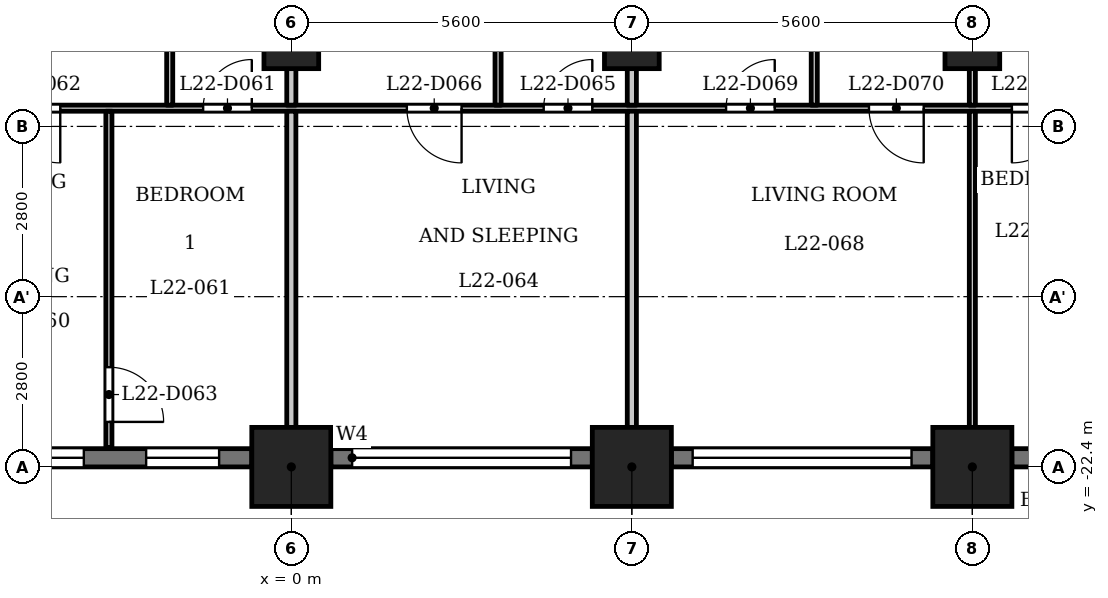
"""IFC4 building model, lengths in metres.
Left out: names, types, materials, properties, quantities, classifications, styles, units other than length and angle.
Written with IfcOpenShell. Run it as: python <this file> out.ifc"""

import sys

from ifc_helpers import new_model, si_unit, direction, frame, frame_2d, origin, origin_2d, place, context, subcontext, project, spatial, rectangle, extrude, element, fill, save


model = new_model("IFC4")
c1 = context("Model", 3, precision=1e-05, world=origin(), true_north=direction((0.0, 1.0)))
c2 = subcontext(c1, "Body", "Model", "MODEL_VIEW")
j1 = project(units=[si_unit("LENGTHUNIT", "METRE"), si_unit("PLANEANGLEUNIT", "RADIAN")], contexts=[c1])
p1 = place(None, origin())
s1 = spatial("IfcSite", under=j1, at=p1, CompositionType="ELEMENT")
p2 = place(p1, origin())
s2 = spatial("IfcBuilding", under=s1, at=p2, CompositionType="ELEMENT")
p3 = place(p2, frame((0.0, 0.0, 90.3)))
s3 = spatial("IfcBuildingStorey", under=s2, at=p3, CompositionType="ELEMENT", Elevation=90.3)
for number, where, z_axis, x_axis in (
    (1, (0.0, -22.4, 0.0), (0.0, 0.0, 1.0), (1.0, 0.0, 0.0)),
    (2, (5.6, -22.4, 0.0), (0.0, 0.0, 1.0), (1.0, 0.0, 0.0)),
    (3, (11.2, -22.4, 0.0), (0.0, 0.0, 1.0), (1.0, 0.0, 0.0)),
):
    element("IfcColumn", number, at=place(p3, frame(where, z_axis=z_axis, x_axis=x_axis)), inside=s3, PredefinedType="COLUMN", context=c2, shape_type="SweptSolid", body=[
        extrude(rectangle(XDim=1.3, YDim=1.3, at=origin_2d()), origin(), (0.0, 0.0, 1.0), 3.5),
    ])
for number, where, z_axis, x_axis in (
    (4, (0.0, -15.4, 0.0), (0.0, 0.0, 1.0), (1.0, 0.0, 0.0)),
    (5, (5.6, -15.4, 0.0), (0.0, 0.0, 1.0), (1.0, 0.0, 0.0)),
    (6, (11.2, -15.4, 0.0), (0.0, 0.0, 1.0), (1.0, 0.0, 0.0)),
):
    element("IfcColumn", number, at=place(p3, frame(where, z_axis=z_axis, x_axis=x_axis)), inside=s3, PredefinedType="COLUMN", context=c2, shape_type="SweptSolid", body=[
        extrude(rectangle(XDim=0.9, YDim=0.9, at=origin_2d()), origin(), (0.0, 0.0, 1.0), 3.5),
    ])
p4 = place(p3, frame((-4.95, -22.25, 0.0), z_axis=(0.0, 0.0, 1.0), x_axis=(1.0, 0.0, 0.0)))
e7 = element("IfcWall", 7, at=p4, inside=s3, PredefinedType="SOLIDWALL", context=c2, shape_type="SweptSolid", body=[
    extrude(rectangle(XDim=4.3, YDim=0.3, at=frame_2d((2.15, 0.0))), origin(), (0.0, 0.0, 1.0), 2.4),
])
p5 = place(p4, frame((0.337, 0.0, 0.6)))
e8 = element("IfcOpeningElement", 8, at=p5, cuts=e7, PredefinedType="OPENING", context=c2, shape_type="SweptSolid", body=[
    extrude(rectangle(XDim=1.2, YDim=1.55, at=frame_2d((0.6, 0.775))), frame((0.0, 0.16, 0.0), z_axis=(0.0, -1.0, 0.0), x_axis=(1.0, 0.0, 0.0)), (0.0, 0.0, 1.0), 0.32),
])
p6 = place(p4, frame((2.562, 0.0, 0.6)))
e9 = element("IfcOpeningElement", 9, at=p6, cuts=e7, PredefinedType="OPENING", context=c2, shape_type="SweptSolid", body=[
    extrude(rectangle(XDim=1.2, YDim=1.55, at=frame_2d((0.6, 0.775))), frame((0.0, 0.16, 0.0), z_axis=(0.0, -1.0, 0.0), x_axis=(1.0, 0.0, 0.0)), (0.0, 0.0, 1.0), 0.32),
])
p7 = place(p3, frame((0.65, -22.25, 0.0), z_axis=(0.0, 0.0, 1.0), x_axis=(1.0, 0.0, 0.0)))
e10 = element("IfcWall", 10, at=p7, inside=s3, PredefinedType="SOLIDWALL", context=c2, shape_type="SweptSolid", body=[
    extrude(rectangle(XDim=4.3, YDim=0.3, at=frame_2d((2.15, 0.0))), origin(), (0.0, 0.0, 1.0), 2.4),
])
p8 = place(p7, frame((0.35, 0.0, 1.2)))
e11 = element("IfcOpeningElement", 11, at=p8, cuts=e10, PredefinedType="OPENING", context=c2, shape_type="SweptSolid", body=[
    extrude(rectangle(XDim=3.6, YDim=0.95, at=frame_2d((1.8, 0.475))), frame((0.0, 0.16, 0.0), z_axis=(0.0, -1.0, 0.0), x_axis=(1.0, 0.0, 0.0)), (0.0, 0.0, 1.0), 0.32),
])
p9 = place(p3, frame((6.25, -22.25, 0.0), z_axis=(0.0, 0.0, 1.0), x_axis=(1.0, 0.0, 0.0)))
e12 = element("IfcWall", 12, at=p9, inside=s3, PredefinedType="SOLIDWALL", context=c2, shape_type="SweptSolid", body=[
    extrude(rectangle(XDim=4.3, YDim=0.3, at=frame_2d((2.15, 0.0))), origin(), (0.0, 0.0, 1.0), 2.4),
])
p10 = place(p9, frame((0.35, 0.0, 1.2)))
e13 = element("IfcOpeningElement", 13, at=p10, cuts=e12, PredefinedType="OPENING", context=c2, shape_type="SweptSolid", body=[
    extrude(rectangle(XDim=3.6, YDim=0.95, at=frame_2d((1.8, 0.475))), frame((0.0, 0.16, 0.0), z_axis=(0.0, -1.0, 0.0), x_axis=(1.0, 0.0, 0.0)), (0.0, 0.0, 1.0), 0.32),
])
p11 = place(p3, frame((11.85, -22.25, 0.0), z_axis=(0.0, 0.0, 1.0), x_axis=(1.0, 0.0, 0.0)))
e14 = element("IfcWall", 14, at=p11, inside=s3, PredefinedType="SOLIDWALL", context=c2, shape_type="SweptSolid", body=[
    extrude(rectangle(XDim=4.3, YDim=0.3, at=frame_2d((2.15, 0.0))), origin(), (0.0, 0.0, 1.0), 2.4),
])
p12 = place(p11, frame((0.337, 0.0, 0.6)))
e15 = element("IfcOpeningElement", 15, at=p12, cuts=e14, PredefinedType="OPENING", context=c2, shape_type="SweptSolid", body=[
    extrude(rectangle(XDim=1.2, YDim=1.55, at=frame_2d((0.6, 0.775))), frame((0.0, 0.16, 0.0), z_axis=(0.0, -1.0, 0.0), x_axis=(1.0, 0.0, 0.0)), (0.0, 0.0, 1.0), 0.32),
])
p13 = place(p11, frame((2.562, 0.0, 0.6)))
e16 = element("IfcOpeningElement", 16, at=p13, cuts=e14, PredefinedType="OPENING", context=c2, shape_type="SweptSolid", body=[
    extrude(rectangle(XDim=1.2, YDim=1.55, at=frame_2d((0.6, 0.775))), frame((0.0, 0.16, 0.0), z_axis=(0.0, -1.0, 0.0), x_axis=(1.0, 0.0, 0.0)), (0.0, 0.0, 1.0), 0.32),
])
p14 = place(p3, frame((-16.725, -16.5, 0.0), z_axis=(0.0, 0.0, 1.0), x_axis=(1.0, 0.0, 0.0)))
e17 = element("IfcWall", 17, at=p14, inside=s3, PredefinedType="PARTITIONING", context=c2, shape_type="SweptSolid", body=[
    extrude(rectangle(XDim=33.45, YDim=0.1, at=frame_2d((16.725, 0.0))), origin(), (0.0, 0.0, 1.0), 3.2),
])
p15 = place(p14, frame((3.825, 0.0, 0.0)))
e18 = element("IfcOpeningElement", 18, at=p15, cuts=e17, PredefinedType="OPENING", context=c2, shape_type="SweptSolid", body=[
    extrude(rectangle(XDim=0.8, YDim=2.1, at=frame_2d((0.4, 1.05))), frame((0.0, 0.06, 0.0), z_axis=(0.0, -1.0, 0.0), x_axis=(1.0, 0.0, 0.0)), (0.0, 0.0, 1.0), 0.12),
])
p16 = place(p14, frame((1.825, 0.0, 0.0)))
e19 = element("IfcOpeningElement", 19, at=p16, cuts=e17, PredefinedType="OPENING", context=c2, shape_type="SweptSolid", body=[
    extrude(rectangle(XDim=0.9, YDim=2.1, at=frame_2d((0.45, 1.05))), frame((0.0, 0.06, 0.0), z_axis=(0.0, -1.0, 0.0), x_axis=(1.0, 0.0, 0.0)), (0.0, 0.0, 1.0), 0.12),
])
p17 = place(p14, frame((9.675, 0.0, 0.0)))
e20 = element("IfcOpeningElement", 20, at=p17, cuts=e17, PredefinedType="OPENING", context=c2, shape_type="SweptSolid", body=[
    extrude(rectangle(XDim=0.8, YDim=2.1, at=frame_2d((0.4, 1.05))), frame((0.0, 0.06, 0.0), z_axis=(0.0, -1.0, 0.0), x_axis=(1.0, 0.0, 0.0)), (0.0, 0.0, 1.0), 0.12),
])
p18 = place(p14, frame((6.425, 0.0, 0.0)))
e21 = element("IfcOpeningElement", 21, at=p18, cuts=e17, PredefinedType="OPENING", context=c2, shape_type="SweptSolid", body=[
    extrude(rectangle(XDim=0.9, YDim=2.1, at=frame_2d((0.45, 1.05))), frame((0.0, 0.06, 0.0), z_axis=(0.0, -1.0, 0.0), x_axis=(1.0, 0.0, 0.0)), (0.0, 0.0, 1.0), 0.12),
])
p19 = place(p14, frame((15.275, 0.0, 0.0)))
e22 = element("IfcOpeningElement", 22, at=p19, cuts=e17, PredefinedType="OPENING", context=c2, shape_type="SweptSolid", body=[
    extrude(rectangle(XDim=0.8, YDim=2.1, at=frame_2d((0.4, 1.05))), frame((0.0, 0.06, 0.0), z_axis=(0.0, -1.0, 0.0), x_axis=(1.0, 0.0, 0.0)), (0.0, 0.0, 1.0), 0.12),
])
p20 = place(p14, frame((12.025, 0.0, 0.0)))
e23 = element("IfcOpeningElement", 23, at=p20, cuts=e17, PredefinedType="OPENING", context=c2, shape_type="SweptSolid", body=[
    extrude(rectangle(XDim=0.9, YDim=2.1, at=frame_2d((0.45, 1.05))), frame((0.0, 0.06, 0.0), z_axis=(0.0, -1.0, 0.0), x_axis=(1.0, 0.0, 0.0)), (0.0, 0.0, 1.0), 0.12),
])
p21 = place(p14, frame((20.875, 0.0, 0.0)))
e24 = element("IfcOpeningElement", 24, at=p21, cuts=e17, PredefinedType="OPENING", context=c2, shape_type="SweptSolid", body=[
    extrude(rectangle(XDim=0.8, YDim=2.1, at=frame_2d((0.4, 1.05))), frame((0.0, 0.06, 0.0), z_axis=(0.0, -1.0, 0.0), x_axis=(1.0, 0.0, 0.0)), (0.0, 0.0, 1.0), 0.12),
])
p22 = place(p14, frame((18.625, 0.0, 0.0)))
e25 = element("IfcOpeningElement", 25, at=p22, cuts=e17, PredefinedType="OPENING", context=c2, shape_type="SweptSolid", body=[
    extrude(rectangle(XDim=0.9, YDim=2.1, at=frame_2d((0.45, 1.05))), frame((0.0, 0.06, 0.0), z_axis=(0.0, -1.0, 0.0), x_axis=(1.0, 0.0, 0.0)), (0.0, 0.0, 1.0), 0.12),
])
p23 = place(p14, frame((23.875, 0.0, 0.0)))
e26 = element("IfcOpeningElement", 26, at=p23, cuts=e17, PredefinedType="OPENING", context=c2, shape_type="SweptSolid", body=[
    extrude(rectangle(XDim=0.8, YDim=2.1, at=frame_2d((0.4, 1.05))), frame((0.0, 0.06, 0.0), z_axis=(0.0, -1.0, 0.0), x_axis=(1.0, 0.0, 0.0)), (0.0, 0.0, 1.0), 0.12),
])
p24 = place(p14, frame((26.225, 0.0, 0.0)))
e27 = element("IfcOpeningElement", 27, at=p24, cuts=e17, PredefinedType="OPENING", context=c2, shape_type="SweptSolid", body=[
    extrude(rectangle(XDim=0.9, YDim=2.1, at=frame_2d((0.45, 1.05))), frame((0.0, 0.06, 0.0), z_axis=(0.0, -1.0, 0.0), x_axis=(1.0, 0.0, 0.0)), (0.0, 0.0, 1.0), 0.12),
])
p25 = place(p14, frame((28.575, 0.0, 0.0)))
e28 = element("IfcOpeningElement", 28, at=p25, cuts=e17, PredefinedType="OPENING", context=c2, shape_type="SweptSolid", body=[
    extrude(rectangle(XDim=0.9, YDim=2.1, at=frame_2d((0.45, 1.05))), frame((0.0, 0.06, 0.0), z_axis=(0.0, -1.0, 0.0), x_axis=(1.0, 0.0, 0.0)), (0.0, 0.0, 1.0), 0.12),
])
p26 = place(p14, frame((30.675, 0.0, 0.0)))
e29 = element("IfcOpeningElement", 29, at=p26, cuts=e17, PredefinedType="OPENING", context=c2, shape_type="SweptSolid", body=[
    extrude(rectangle(XDim=0.9, YDim=2.1, at=frame_2d((0.45, 1.05))), frame((0.0, 0.06, 0.0), z_axis=(0.0, -1.0, 0.0), x_axis=(1.0, 0.0, 0.0)), (0.0, 0.0, 1.0), 0.12),
])
p27 = place(p3, frame((-3.0, -22.08, 0.0), z_axis=(0.0, 0.0, 1.0), x_axis=(0.0, 1.0, 0.0)))
e30 = element("IfcWall", 30, at=p27, inside=s3, PredefinedType="PARTITIONING", context=c2, shape_type="SweptSolid", body=[
    extrude(rectangle(XDim=5.53, YDim=0.1, at=frame_2d((2.765, 0.0))), origin(), (0.0, 0.0, 1.0), 3.2),
])
p28 = place(p27, frame((0.42, 0.0, 0.0)))
e31 = element("IfcOpeningElement", 31, at=p28, cuts=e30, PredefinedType="OPENING", context=c2, shape_type="SweptSolid", body=[
    extrude(rectangle(XDim=0.9, YDim=2.1, at=frame_2d((0.45, 1.05))), frame((0.0, 0.06, 0.0), z_axis=(0.0, -1.0, 0.0), x_axis=(1.0, 0.0, 0.0)), (0.0, 0.0, 1.0), 0.12),
])
p29 = place(p3, frame((-2.0, -16.45, 0.0), z_axis=(0.0, 0.0, 1.0), x_axis=(0.0, 1.0, 0.0)))
e32 = element("IfcWall", 32, at=p29, inside=s3, PredefinedType="PARTITIONING", context=c2, shape_type="SweptSolid", body=[
    extrude(rectangle(XDim=3.175, YDim=0.1, at=frame_2d((1.587, 0.0))), origin(), (0.0, 0.0, 1.0), 3.2),
])
p30 = place(p3, frame((0.0, -23.03, 0.0), z_axis=(0.0, 0.0, 1.0), x_axis=(0.0, 1.0, 0.0)))
e33 = element("IfcWall", 33, at=p30, inside=s3, PredefinedType="PARTITIONING", context=c2, shape_type="SweptSolid", body=[
    extrude(rectangle(XDim=6.48, YDim=0.15, at=frame_2d((3.24, 0.0))), origin(), (0.0, 0.0, 1.0), 3.2),
])
p31 = place(p3, frame((0.0, -16.45, 0.0), z_axis=(0.0, 0.0, 1.0), x_axis=(0.0, 1.0, 0.0)))
e34 = element("IfcWall", 34, at=p31, inside=s3, PredefinedType="PARTITIONING", context=c2, shape_type="SweptSolid", body=[
    extrude(rectangle(XDim=3.175, YDim=0.15, at=frame_2d((1.587, 0.0))), origin(), (0.0, 0.0, 1.0), 3.2),
])
p32 = place(p3, frame((3.4, -16.45, 0.0), z_axis=(0.0, 0.0, 1.0), x_axis=(0.0, 1.0, 0.0)))
e35 = element("IfcWall", 35, at=p32, inside=s3, PredefinedType="PARTITIONING", context=c2, shape_type="SweptSolid", body=[
    extrude(rectangle(XDim=3.175, YDim=0.1, at=frame_2d((1.587, 0.0))), origin(), (0.0, 0.0, 1.0), 3.2),
])
p33 = place(p3, frame((5.6, -23.03, 0.0), z_axis=(0.0, 0.0, 1.0), x_axis=(0.0, 1.0, 0.0)))
e36 = element("IfcWall", 36, at=p33, inside=s3, PredefinedType="PARTITIONING", context=c2, shape_type="SweptSolid", body=[
    extrude(rectangle(XDim=6.48, YDim=0.15, at=frame_2d((3.24, 0.0))), origin(), (0.0, 0.0, 1.0), 3.2),
])
p34 = place(p3, frame((5.6, -16.45, 0.0), z_axis=(0.0, 0.0, 1.0), x_axis=(0.0, 1.0, 0.0)))
e37 = element("IfcWall", 37, at=p34, inside=s3, PredefinedType="PARTITIONING", context=c2, shape_type="SweptSolid", body=[
    extrude(rectangle(XDim=3.175, YDim=0.15, at=frame_2d((1.587, 0.0))), origin(), (0.0, 0.0, 1.0), 3.2),
])
p35 = place(p3, frame((8.6, -16.45, 0.0), z_axis=(0.0, 0.0, 1.0), x_axis=(0.0, 1.0, 0.0)))
e38 = element("IfcWall", 38, at=p35, inside=s3, PredefinedType="PARTITIONING", context=c2, shape_type="SweptSolid", body=[
    extrude(rectangle(XDim=3.175, YDim=0.1, at=frame_2d((1.587, 0.0))), origin(), (0.0, 0.0, 1.0), 3.2),
])
p36 = place(p3, frame((11.2, -23.03, 0.0), z_axis=(0.0, 0.0, 1.0), x_axis=(0.0, 1.0, 0.0)))
e39 = element("IfcWall", 39, at=p36, inside=s3, PredefinedType="PARTITIONING", context=c2, shape_type="SweptSolid", body=[
    extrude(rectangle(XDim=6.48, YDim=0.1, at=frame_2d((3.24, 0.0))), origin(), (0.0, 0.0, 1.0), 3.2),
])
p37 = place(p3, frame((11.2, -16.45, 0.0), z_axis=(0.0, 0.0, 1.0), x_axis=(0.0, 1.0, 0.0)))
e40 = element("IfcWall", 40, at=p37, inside=s3, PredefinedType="PARTITIONING", context=c2, shape_type="SweptSolid", body=[
    extrude(rectangle(XDim=3.175, YDim=0.1, at=frame_2d((1.587, 0.0))), origin(), (0.0, 0.0, 1.0), 3.2),
])
p38 = place(p37, frame((1.699, 0.0, 0.0)))
e41 = element("IfcOpeningElement", 41, at=p38, cuts=e40, PredefinedType="OPENING", context=c2, shape_type="SweptSolid", body=[
    extrude(rectangle(XDim=0.9, YDim=2.1, at=frame_2d((0.45, 1.05))), frame((0.0, 0.06, 0.0), z_axis=(0.0, -1.0, 0.0), x_axis=(1.0, 0.0, 0.0)), (0.0, 0.0, 1.0), 0.12),
])
p39 = place(p19, origin())
e42 = element("IfcDoor", 42, at=p39, inside=s3, OperationType="SINGLE_SWING_LEFT", PredefinedType="DOOR", context=c2, shape_type="SweptSolid", body=[
    extrude(rectangle(XDim=0.8, YDim=2.1, at=frame_2d((0.4, 1.05))), frame((0.0, 0.025, 0.0), z_axis=(0.0, -1.0, 0.0), x_axis=(1.0, 0.0, 0.0)), (0.0, 0.0, 1.0), 0.05),
])
fill(e22, e42)
p40 = place(p20, origin())
e43 = element("IfcDoor", 43, at=p40, inside=s3, OperationType="SINGLE_SWING_RIGHT", PredefinedType="DOOR", context=c2, shape_type="SweptSolid", body=[
    extrude(rectangle(XDim=0.9, YDim=2.1, at=frame_2d((0.45, 1.05))), frame((0.0, 0.025, 0.0), z_axis=(0.0, -1.0, 0.0), x_axis=(1.0, 0.0, 0.0)), (0.0, 0.0, 1.0), 0.05),
])
fill(e23, e43)
p41 = place(p28, origin())
e44 = element("IfcDoor", 44, at=p41, inside=s3, OperationType="SINGLE_SWING_LEFT", PredefinedType="DOOR", context=c2, shape_type="SweptSolid", body=[
    extrude(rectangle(XDim=0.9, YDim=2.1, at=frame_2d((0.45, 1.05))), frame((0.0, 0.025, 0.0), z_axis=(0.0, -1.0, 0.0), x_axis=(1.0, 0.0, 0.0)), (0.0, 0.0, 1.0), 0.05),
])
fill(e31, e44)
p42 = place(p21, origin())
e45 = element("IfcDoor", 45, at=p42, inside=s3, OperationType="SINGLE_SWING_LEFT", PredefinedType="DOOR", context=c2, shape_type="SweptSolid", body=[
    extrude(rectangle(XDim=0.8, YDim=2.1, at=frame_2d((0.4, 1.05))), frame((0.0, 0.025, 0.0), z_axis=(0.0, -1.0, 0.0), x_axis=(1.0, 0.0, 0.0)), (0.0, 0.0, 1.0), 0.05),
])
fill(e24, e45)
p43 = place(p22, origin())
e46 = element("IfcDoor", 46, at=p43, inside=s3, OperationType="SINGLE_SWING_RIGHT", PredefinedType="DOOR", context=c2, shape_type="SweptSolid", body=[
    extrude(rectangle(XDim=0.9, YDim=2.1, at=frame_2d((0.45, 1.05))), frame((0.0, 0.025, 0.0), z_axis=(0.0, -1.0, 0.0), x_axis=(1.0, 0.0, 0.0)), (0.0, 0.0, 1.0), 0.05),
])
fill(e25, e46)
p44 = place(p23, origin())
e47 = element("IfcDoor", 47, at=p44, inside=s3, OperationType="SINGLE_SWING_LEFT", PredefinedType="DOOR", context=c2, shape_type="SweptSolid", body=[
    extrude(rectangle(XDim=0.8, YDim=2.1, at=frame_2d((0.4, 1.05))), frame((0.0, 0.025, 0.0), z_axis=(0.0, -1.0, 0.0), x_axis=(1.0, 0.0, 0.0)), (0.0, 0.0, 1.0), 0.05),
])
fill(e26, e47)
p45 = place(p24, origin())
e48 = element("IfcDoor", 48, at=p45, inside=s3, OperationType="SINGLE_SWING_RIGHT", PredefinedType="DOOR", context=c2, shape_type="SweptSolid", body=[
    extrude(rectangle(XDim=0.9, YDim=2.1, at=frame_2d((0.45, 1.05))), frame((0.0, 0.025, 0.0), z_axis=(0.0, -1.0, 0.0), x_axis=(1.0, 0.0, 0.0)), (0.0, 0.0, 1.0), 0.05),
])
fill(e27, e48)
p46 = place(p25, origin())
e49 = element("IfcDoor", 49, at=p46, inside=s3, OperationType="SINGLE_SWING_LEFT", PredefinedType="DOOR", context=c2, shape_type="SweptSolid", body=[
    extrude(rectangle(XDim=0.9, YDim=2.1, at=frame_2d((0.45, 1.05))), frame((0.0, 0.025, 0.0), z_axis=(0.0, -1.0, 0.0), x_axis=(1.0, 0.0, 0.0)), (0.0, 0.0, 1.0), 0.05),
])
fill(e28, e49)
p47 = place(p5, origin())
e50 = element("IfcWindow", 50, at=p47, inside=s3, PartitioningType="SINGLE_PANEL", PredefinedType="WINDOW", context=c2, shape_type="SweptSolid", body=[
    extrude(rectangle(XDim=1.2, YDim=1.55, at=frame_2d((0.6, 0.775))), frame((0.0, 0.03, 0.0), z_axis=(0.0, -1.0, 0.0), x_axis=(1.0, 0.0, 0.0)), (0.0, 0.0, 1.0), 0.06),
])
fill(e8, e50)
p48 = place(p6, origin())
e51 = element("IfcWindow", 51, at=p48, inside=s3, PartitioningType="SINGLE_PANEL", PredefinedType="WINDOW", context=c2, shape_type="SweptSolid", body=[
    extrude(rectangle(XDim=1.2, YDim=1.55, at=frame_2d((0.6, 0.775))), frame((0.0, 0.03, 0.0), z_axis=(0.0, -1.0, 0.0), x_axis=(1.0, 0.0, 0.0)), (0.0, 0.0, 1.0), 0.06),
])
fill(e9, e51)
p49 = place(p8, origin())
e52 = element("IfcWindow", 52, at=p49, inside=s3, PartitioningType="SINGLE_PANEL", PredefinedType="WINDOW", context=c2, shape_type="SweptSolid", body=[
    extrude(rectangle(XDim=3.6, YDim=0.95, at=frame_2d((1.8, 0.475))), frame((0.0, 0.03, 0.0), z_axis=(0.0, -1.0, 0.0), x_axis=(1.0, 0.0, 0.0)), (0.0, 0.0, 1.0), 0.06),
])
fill(e11, e52)
p50 = place(p10, origin())
e53 = element("IfcWindow", 53, at=p50, inside=s3, PartitioningType="SINGLE_PANEL", PredefinedType="WINDOW", context=c2, shape_type="SweptSolid", body=[
    extrude(rectangle(XDim=3.6, YDim=0.95, at=frame_2d((1.8, 0.475))), frame((0.0, 0.03, 0.0), z_axis=(0.0, -1.0, 0.0), x_axis=(1.0, 0.0, 0.0)), (0.0, 0.0, 1.0), 0.06),
])
fill(e13, e53)
save(model, sys.argv[1])
